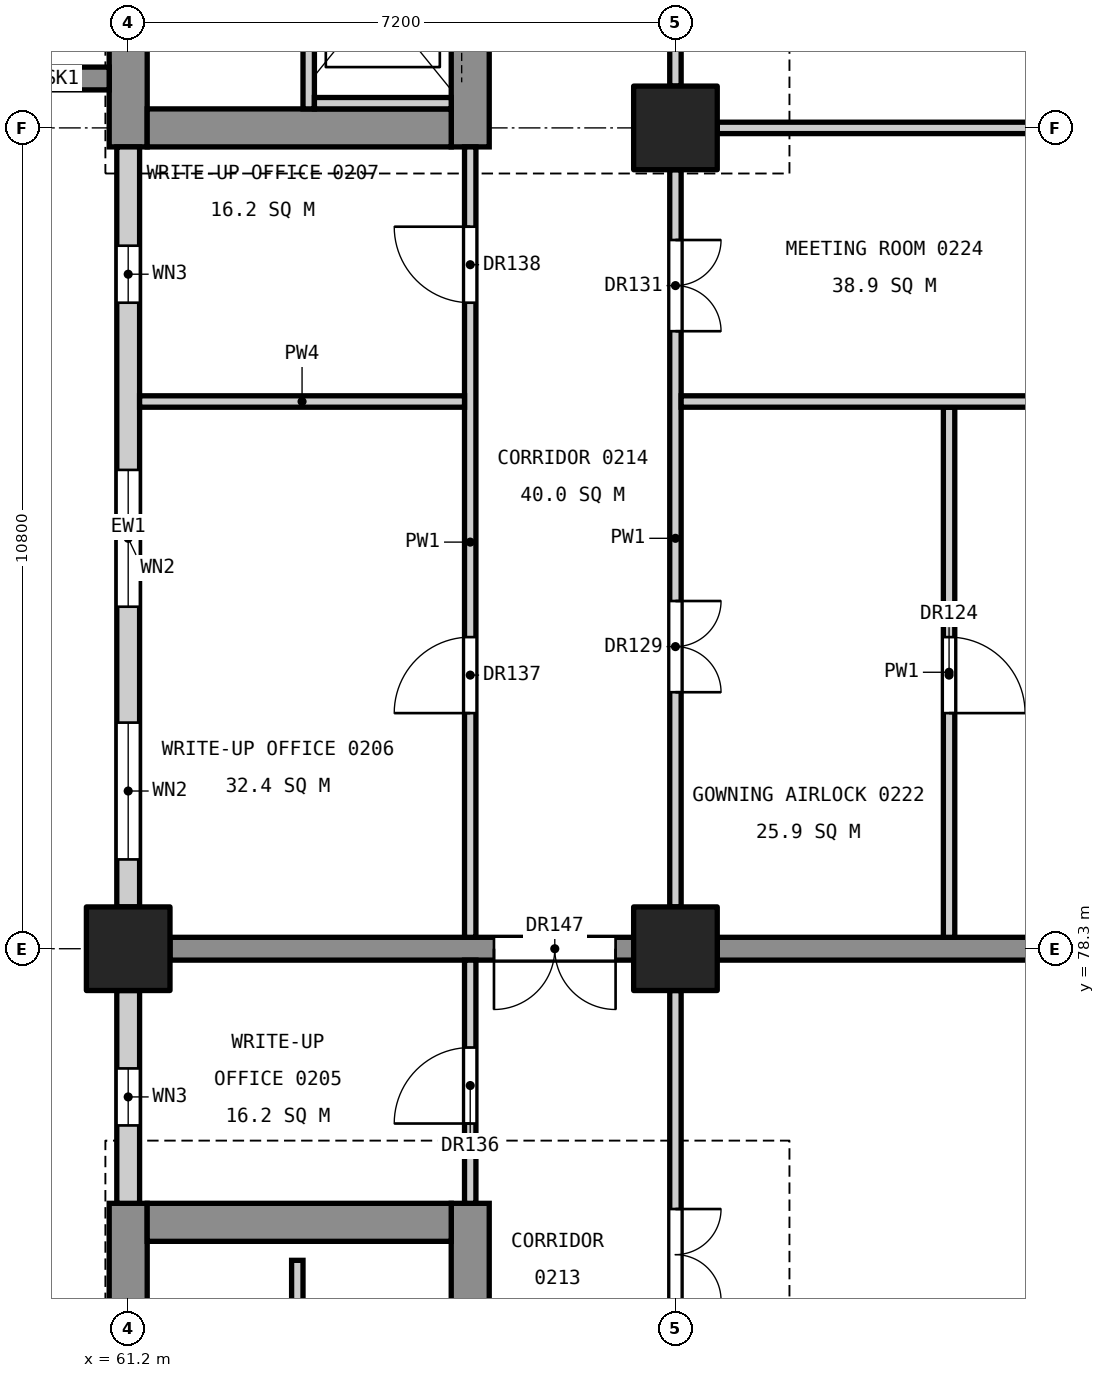
"""IFC4 building model, lengths in metres.
Left out: names, types, materials, properties, quantities, classifications, styles, units other than length and angle.
Written with IfcOpenShell. Run it as: python <this file> out.ifc"""

import sys

from ifc_helpers import new_model, si_unit, direction, frame, frame_2d, origin, origin_2d, place, context, subcontext, project, spatial, rectangle, extrude, element, fill, save


model = new_model("IFC4")
c1 = context("Model", 3, precision=1e-05, world=origin(), true_north=direction((0.0, 1.0)))
c2 = subcontext(c1, "Body", "Model", "MODEL_VIEW")
j1 = project(units=[si_unit("LENGTHUNIT", "METRE"), si_unit("PLANEANGLEUNIT", "RADIAN")], contexts=[c1])
p1 = place(None, origin())
s1 = spatial("IfcSite", under=j1, at=p1, CompositionType="ELEMENT")
p2 = place(p1, origin())
s2 = spatial("IfcBuilding", under=s1, at=p2, CompositionType="ELEMENT")
p3 = place(p2, frame((0.0, 0.0, 11.4)))
s3 = spatial("IfcBuildingStorey", under=s2, at=p3, CompositionType="ELEMENT", Elevation=11.4)
for number, where, z_axis, x_axis in (
    (1, (61.2, 78.3, 0.0), (0.0, 0.0, 1.0), (1.0, 0.0, 0.0)),
    (2, (68.4, 78.3, 0.0), (0.0, 0.0, 1.0), (1.0, 0.0, 0.0)),
    (3, (68.4, 89.1, 0.0), (0.0, 0.0, 1.0), (1.0, 0.0, 0.0)),
):
    element("IfcColumn", number, at=place(p3, frame(where, z_axis=z_axis, x_axis=x_axis)), inside=s3, PredefinedType="COLUMN", context=c2, shape_type="SweptSolid", body=[
        extrude(rectangle(XDim=1.1, YDim=1.1, at=origin_2d()), origin(), (0.0, 0.0, 1.0), 5.4),
    ])
p4 = place(p3, frame((61.2, 60.05, 0.0), z_axis=(0.0, 0.0, 1.0), x_axis=(0.0, 1.0, 0.0)))
e4 = element("IfcWall", 4, at=p4, inside=s3, PredefinedType="SHEAR", context=c2, shape_type="SweptSolid", body=[
    extrude(rectangle(XDim=14.9, YDim=0.5, at=frame_2d((7.45, 0.0))), origin(), (0.0, 0.0, 1.0), 5.1),
])
p5 = place(p4, frame((6.3, 0.0, 3.4)))
e5 = element("IfcOpeningElement", 5, at=p5, cuts=e4, PredefinedType="OPENING", context=c2, shape_type="SweptSolid", body=[
    extrude(rectangle(XDim=1.2, YDim=0.9, at=frame_2d((0.6, 0.45))), frame((0.0, 0.26, 0.0), z_axis=(0.0, -1.0, 0.0), x_axis=(1.0, 0.0, 0.0)), (0.0, 0.0, 1.0), 0.52),
])
p6 = place(p3, frame((65.7, 60.05, 0.0), z_axis=(0.0, 0.0, 1.0), x_axis=(0.0, 1.0, 0.0)))
e6 = element("IfcWall", 6, at=p6, inside=s3, PredefinedType="SHEAR", context=c2, shape_type="SweptSolid", body=[
    extrude(rectangle(XDim=14.9, YDim=0.5, at=frame_2d((7.45, 0.0))), origin(), (0.0, 0.0, 1.0), 5.1),
])
p7 = place(p6, frame((0.55, 0.0, 0.0)))
e7 = element("IfcOpeningElement", 7, at=p7, cuts=e6, PredefinedType="OPENING", context=c2, shape_type="SweptSolid", body=[
    extrude(rectangle(XDim=1.4, YDim=2.1, at=frame_2d((0.7, 1.05))), frame((0.0, 0.26, 0.0), z_axis=(0.0, -1.0, 0.0), x_axis=(1.0, 0.0, 0.0)), (0.0, 0.0, 1.0), 0.52),
])
p8 = place(p6, frame((8.85, 0.0, 0.0)))
e8 = element("IfcOpeningElement", 8, at=p8, cuts=e6, PredefinedType="OPENING", context=c2, shape_type="SweptSolid", body=[
    extrude(rectangle(XDim=1.1, YDim=2.1, at=frame_2d((0.55, 1.05))), frame((0.0, 0.26, 0.0), z_axis=(0.0, -1.0, 0.0), x_axis=(1.0, 0.0, 0.0)), (0.0, 0.0, 1.0), 0.52),
])
p9 = place(p6, frame((11.4, 0.0, 0.0)))
e9 = element("IfcOpeningElement", 9, at=p9, cuts=e6, PredefinedType="OPENING", context=c2, shape_type="SweptSolid", body=[
    extrude(rectangle(XDim=1.1, YDim=2.1, at=frame_2d((0.55, 1.05))), frame((0.0, 0.26, 0.0), z_axis=(0.0, -1.0, 0.0), x_axis=(1.0, 0.0, 0.0)), (0.0, 0.0, 1.0), 0.52),
])
p10 = place(p3, frame((61.45, 74.7, 0.0), z_axis=(0.0, 0.0, 1.0), x_axis=(1.0, 0.0, 0.0)))
e10 = element("IfcWall", 10, at=p10, inside=s3, PredefinedType="SHEAR", context=c2, shape_type="SweptSolid", body=[
    extrude(rectangle(XDim=4.0, YDim=0.5, at=frame_2d((2.0, 0.0))), origin(), (0.0, 0.0, 1.0), 5.1),
])
p11 = place(p3, frame((61.2, 88.85, 0.0), z_axis=(0.0, 0.0, 1.0), x_axis=(0.0, 1.0, 0.0)))
e11 = element("IfcWall", 11, at=p11, inside=s3, PredefinedType="SHEAR", context=c2, shape_type="SweptSolid", body=[
    extrude(rectangle(XDim=11.3, YDim=0.5, at=frame_2d((5.65, 0.0))), origin(), (0.0, 0.0, 1.0), 5.1),
])
p12 = place(p11, frame((3.8, 0.0, 3.4)))
e12 = element("IfcOpeningElement", 12, at=p12, cuts=e11, PredefinedType="OPENING", context=c2, shape_type="SweptSolid", body=[
    extrude(rectangle(XDim=1.2, YDim=0.9, at=frame_2d((0.6, 0.45))), frame((0.0, 0.26, 0.0), z_axis=(0.0, -1.0, 0.0), x_axis=(1.0, 0.0, 0.0)), (0.0, 0.0, 1.0), 0.52),
])
p13 = place(p3, frame((65.7, 88.85, 0.0), z_axis=(0.0, 0.0, 1.0), x_axis=(0.0, 1.0, 0.0)))
e13 = element("IfcWall", 13, at=p13, inside=s3, PredefinedType="SHEAR", context=c2, shape_type="SweptSolid", body=[
    extrude(rectangle(XDim=11.3, YDim=0.5, at=frame_2d((5.65, 0.0))), origin(), (0.0, 0.0, 1.0), 5.1),
])
p14 = place(p13, frame((9.35, 0.0, 0.0)))
e14 = element("IfcOpeningElement", 14, at=p14, cuts=e13, PredefinedType="OPENING", context=c2, shape_type="SweptSolid", body=[
    extrude(rectangle(XDim=1.4, YDim=2.1, at=frame_2d((0.7, 1.05))), frame((0.0, 0.26, 0.0), z_axis=(0.0, -1.0, 0.0), x_axis=(1.0, 0.0, 0.0)), (0.0, 0.0, 1.0), 0.52),
])
p15 = place(p13, frame((1.4, 0.0, 0.0)))
e15 = element("IfcOpeningElement", 15, at=p15, cuts=e13, PredefinedType="OPENING", context=c2, shape_type="SweptSolid", body=[
    extrude(rectangle(XDim=1.1, YDim=2.1, at=frame_2d((0.55, 1.05))), frame((0.0, 0.26, 0.0), z_axis=(0.0, -1.0, 0.0), x_axis=(1.0, 0.0, 0.0)), (0.0, 0.0, 1.0), 0.52),
])
p16 = place(p3, frame((61.45, 89.1, 0.0), z_axis=(0.0, 0.0, 1.0), x_axis=(1.0, 0.0, 0.0)))
e16 = element("IfcWall", 16, at=p16, inside=s3, PredefinedType="SHEAR", context=c2, shape_type="SweptSolid", body=[
    extrude(rectangle(XDim=4.0, YDim=0.5, at=frame_2d((2.0, 0.0))), origin(), (0.0, 0.0, 1.0), 5.1),
])
p17 = place(p3, frame((60.95, 89.75, 0.0), z_axis=(0.0, 0.0, 1.0), x_axis=(-1.0, 0.0, 0.0)))
e17 = element("IfcWall", 17, at=p17, inside=s3, PredefinedType="SHEAR", context=c2, shape_type="SweptSolid", body=[
    extrude(rectangle(XDim=1.25, YDim=0.3, at=frame_2d((0.625, 0.0))), origin(), (0.0, 0.0, 1.0), 5.4),
])
p18 = place(p3, frame((61.75, 78.3, 0.0), z_axis=(0.0, 0.0, 1.0), x_axis=(1.0, 0.0, 0.0)))
e18 = element("IfcWall", 18, at=p18, inside=s3, PredefinedType="SHEAR", context=c2, shape_type="SweptSolid", body=[
    extrude(rectangle(XDim=6.1, YDim=0.3, at=frame_2d((3.05, 0.0))), origin(), (0.0, 0.0, 1.0), 5.1),
])
p19 = place(p18, frame((4.262, 0.0, 0.0)))
e19 = element("IfcOpeningElement", 19, at=p19, cuts=e18, PredefinedType="OPENING", context=c2, shape_type="SweptSolid", body=[
    extrude(rectangle(XDim=1.6, YDim=2.1, at=frame_2d((0.8, 1.05))), frame((0.0, 0.16, 0.0), z_axis=(0.0, -1.0, 0.0), x_axis=(1.0, 0.0, 0.0)), (0.0, 0.0, 1.0), 0.32),
])
p20 = place(p3, frame((68.95, 78.3, 0.0), z_axis=(0.0, 0.0, 1.0), x_axis=(1.0, 0.0, 0.0)))
e20 = element("IfcWall", 20, at=p20, inside=s3, PredefinedType="SHEAR", context=c2, shape_type="SweptSolid", body=[
    extrude(rectangle(XDim=9.7, YDim=0.3, at=frame_2d((4.85, 0.0))), origin(), (0.0, 0.0, 1.0), 5.1),
])
p21 = place(p3, frame((63.575, 92.0, 0.0), z_axis=(0.0, 0.0, 1.0), x_axis=(0.0, -1.0, 0.0)))
e21 = element("IfcWall", 21, at=p21, inside=s3, PredefinedType="SOLIDWALL", context=c2, shape_type="SweptSolid", body=[
    extrude(rectangle(XDim=2.65, YDim=0.15, at=frame_2d((1.325, 0.0))), origin(), (0.0, 0.0, 1.0), 5.4),
])
p22 = place(p3, frame((63.65, 89.425, 0.0), z_axis=(0.0, 0.0, 1.0), x_axis=(1.0, 0.0, 0.0)))
e22 = element("IfcWall", 22, at=p22, inside=s3, PredefinedType="SOLIDWALL", context=c2, shape_type="SweptSolid", body=[
    extrude(rectangle(XDim=1.8, YDim=0.15, at=frame_2d((0.9, 0.0))), origin(), (0.0, 0.0, 1.0), 5.4),
])
p23 = place(p3, frame((63.425, 73.3, 0.0), z_axis=(0.0, 0.0, 1.0), x_axis=(0.0, 1.0, 0.0)))
e23 = element("IfcWall", 23, at=p23, inside=s3, PredefinedType="SOLIDWALL", context=c2, shape_type="SweptSolid", body=[
    extrude(rectangle(XDim=0.9, YDim=0.15, at=frame_2d((0.45, 0.0))), origin(), (0.0, 0.0, 1.0), 5.4),
])
p24 = place(p3, frame((61.2, 74.95, 0.0), z_axis=(0.0, 0.0, 1.0), x_axis=(0.0, 1.0, 0.0)))
e24 = element("IfcWall", 24, at=p24, inside=s3, PredefinedType="STANDARD", context=c2, shape_type="SweptSolid", body=[
    extrude(rectangle(XDim=2.8, YDim=0.3, at=frame_2d((1.4, 0.0))), origin(), (0.0, 0.0, 1.0), 4.1),
])
p25 = place(p24, frame((1.025, 0.0, 0.8)))
e25 = element("IfcOpeningElement", 25, at=p25, cuts=e24, PredefinedType="OPENING", context=c2, shape_type="SweptSolid", body=[
    extrude(rectangle(XDim=0.75, YDim=1.2, at=frame_2d((0.375, 0.6))), frame((0.0, 0.16, 0.0), z_axis=(0.0, -1.0, 0.0), x_axis=(1.0, 0.0, 0.0)), (0.0, 0.0, 1.0), 0.32),
])
p26 = place(p3, frame((61.2, 78.85, 0.0), z_axis=(0.0, 0.0, 1.0), x_axis=(0.0, 1.0, 0.0)))
e26 = element("IfcWall", 26, at=p26, inside=s3, PredefinedType="STANDARD", context=c2, shape_type="SweptSolid", body=[
    extrude(rectangle(XDim=10.0, YDim=0.3, at=frame_2d((5.0, 0.0))), origin(), (0.0, 0.0, 1.0), 4.1),
])
p27 = place(p26, frame((0.625, 0.0, 0.9)))
e27 = element("IfcOpeningElement", 27, at=p27, cuts=e26, PredefinedType="OPENING", context=c2, shape_type="SweptSolid", body=[
    extrude(rectangle(XDim=1.8, YDim=3.0, at=frame_2d((0.9, 1.5))), frame((0.0, 0.16, 0.0), z_axis=(0.0, -1.0, 0.0), x_axis=(1.0, 0.0, 0.0)), (0.0, 0.0, 1.0), 0.32),
])
p28 = place(p26, frame((3.95, 0.0, 0.9)))
e28 = element("IfcOpeningElement", 28, at=p28, cuts=e26, PredefinedType="OPENING", context=c2, shape_type="SweptSolid", body=[
    extrude(rectangle(XDim=1.8, YDim=3.0, at=frame_2d((0.9, 1.5))), frame((0.0, 0.16, 0.0), z_axis=(0.0, -1.0, 0.0), x_axis=(1.0, 0.0, 0.0)), (0.0, 0.0, 1.0), 0.32),
])
p29 = place(p26, frame((7.95, 0.0, 0.8)))
e29 = element("IfcOpeningElement", 29, at=p29, cuts=e26, PredefinedType="OPENING", context=c2, shape_type="SweptSolid", body=[
    extrude(rectangle(XDim=0.75, YDim=1.2, at=frame_2d((0.375, 0.6))), frame((0.0, 0.16, 0.0), z_axis=(0.0, -1.0, 0.0), x_axis=(1.0, 0.0, 0.0)), (0.0, 0.0, 1.0), 0.32),
])
p30 = place(p3, frame((65.7, 74.95, 0.0), z_axis=(0.0, 0.0, 1.0), x_axis=(0.0, 1.0, 0.0)))
e30 = element("IfcWall", 30, at=p30, inside=s3, PredefinedType="PARTITIONING", context=c2, shape_type="SweptSolid", body=[
    extrude(rectangle(XDim=3.2, YDim=0.15, at=frame_2d((1.6, 0.0))), origin(), (0.0, 0.0, 1.0), 4.0),
])
p31 = place(p30, frame((1.05, 0.0, 0.0)))
e31 = element("IfcOpeningElement", 31, at=p31, cuts=e30, PredefinedType="OPENING", context=c2, shape_type="SweptSolid", body=[
    extrude(rectangle(XDim=1.0, YDim=2.1, at=frame_2d((0.5, 1.05))), frame((0.0, 0.085, 0.0), z_axis=(0.0, -1.0, 0.0), x_axis=(1.0, 0.0, 0.0)), (0.0, 0.0, 1.0), 0.17),
])
p32 = place(p3, frame((65.7, 78.45, 0.0), z_axis=(0.0, 0.0, 1.0), x_axis=(0.0, 1.0, 0.0)))
e32 = element("IfcWall", 32, at=p32, inside=s3, PredefinedType="PARTITIONING", context=c2, shape_type="SweptSolid", body=[
    extrude(rectangle(XDim=10.4, YDim=0.15, at=frame_2d((5.2, 0.0))), origin(), (0.0, 0.0, 1.0), 4.0),
])
p33 = place(p32, frame((2.95, 0.0, 0.0)))
e33 = element("IfcOpeningElement", 33, at=p33, cuts=e32, PredefinedType="OPENING", context=c2, shape_type="SweptSolid", body=[
    extrude(rectangle(XDim=1.0, YDim=2.1, at=frame_2d((0.5, 1.05))), frame((0.0, 0.085, 0.0), z_axis=(0.0, -1.0, 0.0), x_axis=(1.0, 0.0, 0.0)), (0.0, 0.0, 1.0), 0.17),
])
p34 = place(p32, frame((8.35, 0.0, 0.0)))
e34 = element("IfcOpeningElement", 34, at=p34, cuts=e32, PredefinedType="OPENING", context=c2, shape_type="SweptSolid", body=[
    extrude(rectangle(XDim=1.0, YDim=2.1, at=frame_2d((0.5, 1.05))), frame((0.0, 0.085, 0.0), z_axis=(0.0, -1.0, 0.0), x_axis=(1.0, 0.0, 0.0)), (0.0, 0.0, 1.0), 0.17),
])
p35 = place(p3, frame((61.35, 85.5, 0.0), z_axis=(0.0, 0.0, 1.0), x_axis=(1.0, 0.0, 0.0)))
e35 = element("IfcWall", 35, at=p35, inside=s3, PredefinedType="PARTITIONING", context=c2, shape_type="SweptSolid", body=[
    extrude(rectangle(XDim=4.275, YDim=0.15, at=frame_2d((2.137, 0.0))), origin(), (0.0, 0.0, 1.0), 4.3),
])
p36 = place(p3, frame((68.4, 70.8, 0.0), z_axis=(0.0, 0.0, 1.0), x_axis=(0.0, 1.0, 0.0)))
e36 = element("IfcWall", 36, at=p36, inside=s3, PredefinedType="PARTITIONING", context=c2, shape_type="SweptSolid", body=[
    extrude(rectangle(XDim=6.95, YDim=0.15, at=frame_2d((3.475, 0.0))), origin(), (0.0, 0.0, 1.0), 4.0),
])
p37 = place(p36, frame((2.875, 0.0, 0.0)))
e37 = element("IfcOpeningElement", 37, at=p37, cuts=e36, PredefinedType="OPENING", context=c2, shape_type="SweptSolid", body=[
    extrude(rectangle(XDim=1.2, YDim=2.1, at=frame_2d((0.6, 1.05))), frame((0.0, 0.085, 0.0), z_axis=(0.0, -1.0, 0.0), x_axis=(1.0, 0.0, 0.0)), (0.0, 0.0, 1.0), 0.17),
])
p38 = place(p3, frame((68.4, 78.85, 0.0), z_axis=(0.0, 0.0, 1.0), x_axis=(0.0, 1.0, 0.0)))
e38 = element("IfcWall", 38, at=p38, inside=s3, PredefinedType="PARTITIONING", context=c2, shape_type="SweptSolid", body=[
    extrude(rectangle(XDim=9.7, YDim=0.15, at=frame_2d((4.85, 0.0))), origin(), (0.0, 0.0, 1.0), 4.0),
])
p39 = place(p38, frame((2.825, 0.0, 0.0)))
e39 = element("IfcOpeningElement", 39, at=p39, cuts=e38, PredefinedType="OPENING", context=c2, shape_type="SweptSolid", body=[
    extrude(rectangle(XDim=1.2, YDim=2.1, at=frame_2d((0.6, 1.05))), frame((0.0, 0.085, 0.0), z_axis=(0.0, -1.0, 0.0), x_axis=(1.0, 0.0, 0.0)), (0.0, 0.0, 1.0), 0.17),
])
p40 = place(p38, frame((7.575, 0.0, 0.0)))
e40 = element("IfcOpeningElement", 40, at=p40, cuts=e38, PredefinedType="OPENING", context=c2, shape_type="SweptSolid", body=[
    extrude(rectangle(XDim=1.2, YDim=2.1, at=frame_2d((0.6, 1.05))), frame((0.0, 0.085, 0.0), z_axis=(0.0, -1.0, 0.0), x_axis=(1.0, 0.0, 0.0)), (0.0, 0.0, 1.0), 0.17),
])
p41 = place(p3, frame((68.4, 89.65, 0.0), z_axis=(0.0, 0.0, 1.0), x_axis=(0.0, 1.0, 0.0)))
e41 = element("IfcWall", 41, at=p41, inside=s3, PredefinedType="PARTITIONING", context=c2, shape_type="SweptSolid", body=[
    extrude(rectangle(XDim=3.45, YDim=0.15, at=frame_2d((1.725, 0.0))), origin(), (0.0, 0.0, 1.0), 4.0),
])
p42 = place(p41, frame((1.125, 0.0, 0.0)))
e42 = element("IfcOpeningElement", 42, at=p42, cuts=e41, PredefinedType="OPENING", context=c2, shape_type="SweptSolid", body=[
    extrude(rectangle(XDim=1.2, YDim=2.1, at=frame_2d((0.6, 1.05))), frame((0.0, 0.085, 0.0), z_axis=(0.0, -1.0, 0.0), x_axis=(1.0, 0.0, 0.0)), (0.0, 0.0, 1.0), 0.17),
])
p43 = place(p3, frame((72.0, 78.45, 0.0), z_axis=(0.0, 0.0, 1.0), x_axis=(0.0, 1.0, 0.0)))
e43 = element("IfcWall", 43, at=p43, inside=s3, PredefinedType="PARTITIONING", context=c2, shape_type="SweptSolid", body=[
    extrude(rectangle(XDim=6.975, YDim=0.15, at=frame_2d((3.488, 0.0))), origin(), (0.0, 0.0, 1.0), 4.0),
])
p44 = place(p43, frame((2.95, 0.0, 0.0)))
e44 = element("IfcOpeningElement", 44, at=p44, cuts=e43, PredefinedType="OPENING", context=c2, shape_type="SweptSolid", body=[
    extrude(rectangle(XDim=1.0, YDim=2.1, at=frame_2d((0.5, 1.05))), frame((0.0, 0.085, 0.0), z_axis=(0.0, -1.0, 0.0), x_axis=(1.0, 0.0, 0.0)), (0.0, 0.0, 1.0), 0.17),
])
p45 = place(p3, frame((68.475, 85.5, 0.0), z_axis=(0.0, 0.0, 1.0), x_axis=(1.0, 0.0, 0.0)))
e45 = element("IfcWall", 45, at=p45, inside=s3, PredefinedType="PARTITIONING", context=c2, shape_type="SweptSolid", body=[
    extrude(rectangle(XDim=10.575, YDim=0.15, at=frame_2d((5.288, 0.0))), origin(), (0.0, 0.0, 1.0), 4.3),
])
p46 = place(p3, frame((68.95, 89.1, 0.0), z_axis=(0.0, 0.0, 1.0), x_axis=(1.0, 0.0, 0.0)))
e46 = element("IfcWall", 46, at=p46, inside=s3, PredefinedType="PARTITIONING", context=c2, shape_type="SweptSolid", body=[
    extrude(rectangle(XDim=9.7, YDim=0.15, at=frame_2d((4.85, 0.0))), origin(), (0.0, 0.0, 1.0), 4.3),
])
p47 = place(p25, origin())
e47 = element("IfcWindow", 47, at=p47, inside=s3, PartitioningType="SINGLE_PANEL", PredefinedType="WINDOW", context=c2, shape_type="SweptSolid", body=[
    extrude(rectangle(XDim=0.75, YDim=1.2, at=frame_2d((0.375, 0.6))), frame((0.0, 0.03, 0.0), z_axis=(0.0, -1.0, 0.0), x_axis=(1.0, 0.0, 0.0)), (0.0, 0.0, 1.0), 0.06),
])
fill(e25, e47)
p48 = place(p27, origin())
e48 = element("IfcWindow", 48, at=p48, inside=s3, PartitioningType="SINGLE_PANEL", PredefinedType="WINDOW", context=c2, shape_type="SweptSolid", body=[
    extrude(rectangle(XDim=1.8, YDim=3.0, at=frame_2d((0.9, 1.5))), frame((0.0, 0.03, 0.0), z_axis=(0.0, -1.0, 0.0), x_axis=(1.0, 0.0, 0.0)), (0.0, 0.0, 1.0), 0.06),
])
fill(e27, e48)
p49 = place(p28, origin())
e49 = element("IfcWindow", 49, at=p49, inside=s3, PartitioningType="SINGLE_PANEL", PredefinedType="WINDOW", context=c2, shape_type="SweptSolid", body=[
    extrude(rectangle(XDim=1.8, YDim=3.0, at=frame_2d((0.9, 1.5))), frame((0.0, 0.03, 0.0), z_axis=(0.0, -1.0, 0.0), x_axis=(1.0, 0.0, 0.0)), (0.0, 0.0, 1.0), 0.06),
])
fill(e28, e49)
p50 = place(p29, origin())
e50 = element("IfcWindow", 50, at=p50, inside=s3, PartitioningType="SINGLE_PANEL", PredefinedType="WINDOW", context=c2, shape_type="SweptSolid", body=[
    extrude(rectangle(XDim=0.75, YDim=1.2, at=frame_2d((0.375, 0.6))), frame((0.0, 0.03, 0.0), z_axis=(0.0, -1.0, 0.0), x_axis=(1.0, 0.0, 0.0)), (0.0, 0.0, 1.0), 0.06),
])
fill(e29, e50)
p51 = place(p44, frame((1.0, 0.0, 0.0), z_axis=(0.0, 0.0, 1.0), x_axis=(-1.0, 0.0, 0.0)))
e51 = element("IfcDoor", 51, at=p51, inside=s3, OperationType="SINGLE_SWING_RIGHT", PredefinedType="DOOR", context=c2, shape_type="SweptSolid", body=[
    extrude(rectangle(XDim=1.0, YDim=2.1, at=frame_2d((0.5, 1.05))), frame((0.0, 0.025, 0.0), z_axis=(0.0, -1.0, 0.0), x_axis=(1.0, 0.0, 0.0)), (0.0, 0.0, 1.0), 0.05),
])
fill(e44, e51)
p52 = place(p39, frame((1.2, 0.0, 0.0), z_axis=(0.0, 0.0, 1.0), x_axis=(-1.0, 0.0, 0.0)))
e52 = element("IfcDoor", 52, at=p52, inside=s3, OperationType="DOUBLE_DOOR_SINGLE_SWING", PredefinedType="DOOR", context=c2, shape_type="SweptSolid", body=[
    extrude(rectangle(XDim=1.2, YDim=2.1, at=frame_2d((0.6, 1.05))), frame((0.0, 0.025, 0.0), z_axis=(0.0, -1.0, 0.0), x_axis=(1.0, 0.0, 0.0)), (0.0, 0.0, 1.0), 0.05),
])
fill(e39, e52)
p53 = place(p40, frame((1.2, 0.0, 0.0), z_axis=(0.0, 0.0, 1.0), x_axis=(-1.0, 0.0, 0.0)))
e53 = element("IfcDoor", 53, at=p53, inside=s3, OperationType="DOUBLE_DOOR_SINGLE_SWING", PredefinedType="DOOR", context=c2, shape_type="SweptSolid", body=[
    extrude(rectangle(XDim=1.2, YDim=2.1, at=frame_2d((0.6, 1.05))), frame((0.0, 0.025, 0.0), z_axis=(0.0, -1.0, 0.0), x_axis=(1.0, 0.0, 0.0)), (0.0, 0.0, 1.0), 0.05),
])
fill(e40, e53)
p54 = place(p37, frame((1.2, 0.0, 0.0), z_axis=(0.0, 0.0, 1.0), x_axis=(-1.0, 0.0, 0.0)))
e54 = element("IfcDoor", 54, at=p54, inside=s3, OperationType="DOUBLE_DOOR_SINGLE_SWING", PredefinedType="DOOR", context=c2, shape_type="SweptSolid", body=[
    extrude(rectangle(XDim=1.2, YDim=2.1, at=frame_2d((0.6, 1.05))), frame((0.0, 0.025, 0.0), z_axis=(0.0, -1.0, 0.0), x_axis=(1.0, 0.0, 0.0)), (0.0, 0.0, 1.0), 0.05),
])
fill(e37, e54)
p55 = place(p31, origin())
e55 = element("IfcDoor", 55, at=p55, inside=s3, OperationType="SINGLE_SWING_LEFT", PredefinedType="DOOR", context=c2, shape_type="SweptSolid", body=[
    extrude(rectangle(XDim=1.0, YDim=2.1, at=frame_2d((0.5, 1.05))), frame((0.0, 0.025, 0.0), z_axis=(0.0, -1.0, 0.0), x_axis=(1.0, 0.0, 0.0)), (0.0, 0.0, 1.0), 0.05),
])
fill(e31, e55)
p56 = place(p33, origin())
e56 = element("IfcDoor", 56, at=p56, inside=s3, OperationType="SINGLE_SWING_LEFT", PredefinedType="DOOR", context=c2, shape_type="SweptSolid", body=[
    extrude(rectangle(XDim=1.0, YDim=2.1, at=frame_2d((0.5, 1.05))), frame((0.0, 0.025, 0.0), z_axis=(0.0, -1.0, 0.0), x_axis=(1.0, 0.0, 0.0)), (0.0, 0.0, 1.0), 0.05),
])
fill(e33, e56)
p57 = place(p34, origin())
e57 = element("IfcDoor", 57, at=p57, inside=s3, OperationType="SINGLE_SWING_RIGHT", PredefinedType="DOOR", context=c2, shape_type="SweptSolid", body=[
    extrude(rectangle(XDim=1.0, YDim=2.1, at=frame_2d((0.5, 1.05))), frame((0.0, 0.025, 0.0), z_axis=(0.0, -1.0, 0.0), x_axis=(1.0, 0.0, 0.0)), (0.0, 0.0, 1.0), 0.05),
])
fill(e34, e57)
p58 = place(p19, frame((1.6, 0.0, 0.0), z_axis=(0.0, 0.0, 1.0), x_axis=(-1.0, 0.0, 0.0)))
e58 = element("IfcDoor", 58, at=p58, inside=s3, OperationType="DOUBLE_DOOR_SINGLE_SWING", PredefinedType="DOOR", context=c2, shape_type="SweptSolid", body=[
    extrude(rectangle(XDim=1.6, YDim=2.1, at=frame_2d((0.8, 1.05))), frame((0.0, 0.025, 0.0), z_axis=(0.0, -1.0, 0.0), x_axis=(1.0, 0.0, 0.0)), (0.0, 0.0, 1.0), 0.05),
])
fill(e19, e58)
save(model, sys.argv[1])
